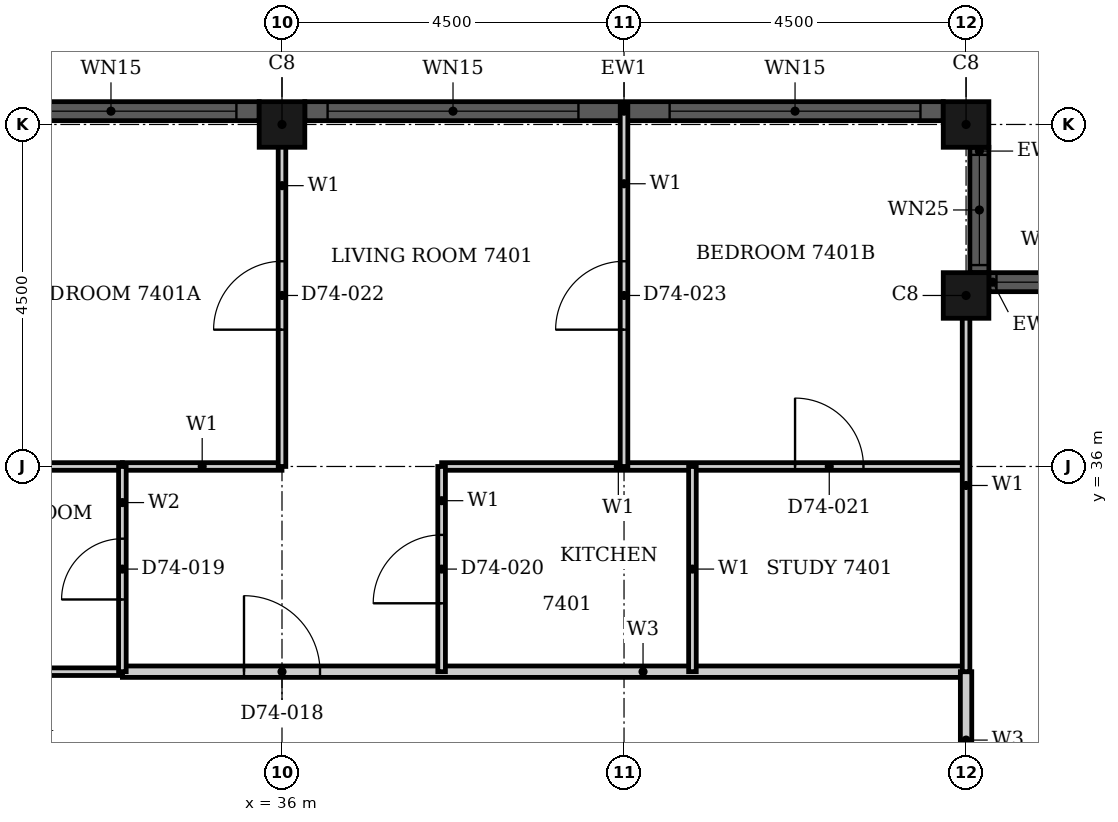
"""IFC4 building model, lengths in metres.
Left out: names, types, materials, properties, quantities, classifications, styles, units other than length and angle.
Written with IfcOpenShell. Run it as: python <this file> out.ifc"""

import sys

from ifc_helpers import new_model, si_unit, direction, frame, frame_2d, origin, origin_2d, place, context, subcontext, project, spatial, rectangle, hollow_rectangle, extrude, element, fill, save


model = new_model("IFC4")
c1 = context("Model", 3, precision=1e-05, world=origin(), true_north=direction((0.0, 1.0)))
c2 = subcontext(c1, "Body", "Model", "MODEL_VIEW")
j1 = project(units=[si_unit("LENGTHUNIT", "METRE"), si_unit("PLANEANGLEUNIT", "RADIAN")], contexts=[c1])
p1 = place(None, origin())
s1 = spatial("IfcSite", under=j1, at=p1, CompositionType="ELEMENT")
p2 = place(p1, origin())
s2 = spatial("IfcBuilding", under=s1, at=p2, CompositionType="ELEMENT")
p3 = place(p2, frame((0.0, 0.0, 290.8)))
s3 = spatial("IfcBuildingStorey", under=s2, at=p3, CompositionType="ELEMENT", Elevation=290.8)
for number, where, z_axis, x_axis in (
    (1, (45.0, 38.25, 0.0), (0.0, 0.0, 1.0), (1.0, 0.0, 0.0)),
    (2, (45.0, 40.5, 0.0), (0.0, 0.0, 1.0), (1.0, 0.0, 0.0)),
    (3, (36.0, 40.5, 0.0), (0.0, 0.0, 1.0), (1.0, 0.0, 0.0)),
):
    element("IfcColumn", number, at=place(p3, frame(where, z_axis=z_axis, x_axis=x_axis)), inside=s3, PredefinedType="COLUMN", context=c2, shape_type="SweptSolid", body=[
        extrude(hollow_rectangle(XDim=0.6, YDim=0.6, WallThickness=0.02, at=origin_2d()), origin(), (0.0, 0.0, 1.0), 3.7),
    ])
p4 = place(p3, frame((46.95, 38.425, 0.0), z_axis=(0.0, 0.0, 1.0), x_axis=(-1.0, 0.0, 0.0)))
e4 = element("IfcWall", 4, at=p4, inside=s3, PredefinedType="SOLIDWALL", context=c2, shape_type="SweptSolid", body=[
    extrude(rectangle(XDim=1.65, YDim=0.25, at=frame_2d((0.825, 0.0))), origin(), (0.0, 0.0, 1.0), 3.7),
])
p5 = place(p4, frame((0.1, 0.0, 0.9)))
e5 = element("IfcOpeningElement", 5, at=p5, cuts=e4, PredefinedType="OPENING", context=c2, shape_type="SweptSolid", body=[
    extrude(rectangle(XDim=1.45, YDim=1.85, at=frame_2d((0.725, 0.925))), frame((0.0, 0.135, 0.0), z_axis=(0.0, -1.0, 0.0), x_axis=(1.0, 0.0, 0.0)), (0.0, 0.0, 1.0), 0.27),
])
p6 = place(p3, frame((45.175, 38.55, 0.0), z_axis=(0.0, 0.0, 1.0), x_axis=(0.0, 1.0, 0.0)))
e6 = element("IfcWall", 6, at=p6, inside=s3, PredefinedType="SOLIDWALL", context=c2, shape_type="SweptSolid", body=[
    extrude(rectangle(XDim=1.65, YDim=0.25, at=frame_2d((0.825, 0.0))), origin(), (0.0, 0.0, 1.0), 3.7),
])
p7 = place(p6, frame((0.1, 0.0, 0.9)))
e7 = element("IfcOpeningElement", 7, at=p7, cuts=e6, PredefinedType="OPENING", context=c2, shape_type="SweptSolid", body=[
    extrude(rectangle(XDim=1.45, YDim=1.85, at=frame_2d((0.725, 0.925))), frame((0.0, 0.135, 0.0), z_axis=(0.0, -1.0, 0.0), x_axis=(1.0, 0.0, 0.0)), (0.0, 0.0, 1.0), 0.27),
])
p8 = place(p3, frame((44.7, 40.675, 0.0), z_axis=(0.0, 0.0, 1.0), x_axis=(-1.0, 0.0, 0.0)))
e8 = element("IfcWall", 8, at=p8, inside=s3, PredefinedType="SOLIDWALL", context=c2, shape_type="SweptSolid", body=[
    extrude(rectangle(XDim=8.4, YDim=0.25, at=frame_2d((4.2, 0.0))), origin(), (0.0, 0.0, 1.0), 3.7),
])
p9 = place(p8, frame((0.3, 0.0, 0.45)))
e9 = element("IfcOpeningElement", 9, at=p9, cuts=e8, PredefinedType="OPENING", context=c2, shape_type="SweptSolid", body=[
    extrude(rectangle(XDim=3.3, YDim=2.3, at=frame_2d((1.65, 1.15))), frame((0.0, 0.135, 0.0), z_axis=(0.0, -1.0, 0.0), x_axis=(1.0, 0.0, 0.0)), (0.0, 0.0, 1.0), 0.27),
])
p10 = place(p8, frame((4.8, 0.0, 0.45)))
e10 = element("IfcOpeningElement", 10, at=p10, cuts=e8, PredefinedType="OPENING", context=c2, shape_type="SweptSolid", body=[
    extrude(rectangle(XDim=3.3, YDim=2.3, at=frame_2d((1.65, 1.15))), frame((0.0, 0.135, 0.0), z_axis=(0.0, -1.0, 0.0), x_axis=(1.0, 0.0, 0.0)), (0.0, 0.0, 1.0), 0.27),
])
p11 = place(p3, frame((35.7, 40.675, 0.0), z_axis=(0.0, 0.0, 1.0), x_axis=(-1.0, 0.0, 0.0)))
e11 = element("IfcWall", 11, at=p11, inside=s3, PredefinedType="SOLIDWALL", context=c2, shape_type="SweptSolid", body=[
    extrude(rectangle(XDim=8.4, YDim=0.25, at=frame_2d((4.2, 0.0))), origin(), (0.0, 0.0, 1.0), 3.7),
])
p12 = place(p11, frame((0.3, 0.0, 0.45)))
e12 = element("IfcOpeningElement", 12, at=p12, cuts=e11, PredefinedType="OPENING", context=c2, shape_type="SweptSolid", body=[
    extrude(rectangle(XDim=3.3, YDim=2.3, at=frame_2d((1.65, 1.15))), frame((0.0, 0.135, 0.0), z_axis=(0.0, -1.0, 0.0), x_axis=(1.0, 0.0, 0.0)), (0.0, 0.0, 1.0), 0.27),
])
p13 = place(p11, frame((4.8, 0.0, 0.45)))
e13 = element("IfcOpeningElement", 13, at=p13, cuts=e11, PredefinedType="OPENING", context=c2, shape_type="SweptSolid", body=[
    extrude(rectangle(XDim=3.3, YDim=2.3, at=frame_2d((1.65, 1.15))), frame((0.0, 0.135, 0.0), z_axis=(0.0, -1.0, 0.0), x_axis=(1.0, 0.0, 0.0)), (0.0, 0.0, 1.0), 0.27),
])
p14 = place(p3, frame((33.9, 33.3, 0.0), z_axis=(0.0, 0.0, 1.0), x_axis=(1.0, 0.0, 0.0)))
e14 = element("IfcWall", 14, at=p14, inside=s3, PredefinedType="PARTITIONING", context=c2, shape_type="SweptSolid", body=[
    extrude(rectangle(XDim=11.1, YDim=0.15, at=frame_2d((5.55, 0.0))), origin(), (0.0, 0.0, 1.0), 3.4),
])
p15 = place(p14, frame((1.6, 0.0, 0.0)))
e15 = element("IfcOpeningElement", 15, at=p15, cuts=e14, PredefinedType="OPENING", context=c2, shape_type="SweptSolid", body=[
    extrude(rectangle(XDim=1.0, YDim=2.2, at=frame_2d((0.5, 1.1))), frame((0.0, 0.085, 0.0), z_axis=(0.0, -1.0, 0.0), x_axis=(1.0, 0.0, 0.0)), (0.0, 0.0, 1.0), 0.17),
])
p16 = place(p3, frame((45.0, 31.5, 0.0), z_axis=(0.0, 0.0, 1.0), x_axis=(0.0, 1.0, 0.0)))
e16 = element("IfcWall", 16, at=p16, inside=s3, PredefinedType="PARTITIONING", context=c2, shape_type="SweptSolid", body=[
    extrude(rectangle(XDim=1.8, YDim=0.15, at=frame_2d((0.9, 0.0))), origin(), (0.0, 0.0, 1.0), 3.4),
])
p17 = place(p3, frame((33.9, 36.0, 0.0), z_axis=(0.0, 0.0, 1.0), x_axis=(1.0, 0.0, 0.0)))
e17 = element("IfcWall", 17, at=p17, inside=s3, PredefinedType="PARTITIONING", context=c2, shape_type="SweptSolid", body=[
    extrude(rectangle(XDim=2.1, YDim=0.1, at=frame_2d((1.05, 0.0))), origin(), (0.0, 0.0, 1.0), 3.4),
])
p18 = place(p3, frame((38.1, 36.0, 0.0), z_axis=(0.0, 0.0, 1.0), x_axis=(1.0, 0.0, 0.0)))
e18 = element("IfcWall", 18, at=p18, inside=s3, PredefinedType="PARTITIONING", context=c2, shape_type="SweptSolid", body=[
    extrude(rectangle(XDim=6.9, YDim=0.1, at=frame_2d((3.45, 0.0))), origin(), (0.0, 0.0, 1.0), 3.4),
])
p19 = place(p18, frame((4.65, 0.0, 0.0)))
e19 = element("IfcOpeningElement", 19, at=p19, cuts=e18, PredefinedType="OPENING", context=c2, shape_type="SweptSolid", body=[
    extrude(rectangle(XDim=0.9, YDim=2.1, at=frame_2d((0.45, 1.05))), frame((0.0, 0.06, 0.0), z_axis=(0.0, -1.0, 0.0), x_axis=(1.0, 0.0, 0.0)), (0.0, 0.0, 1.0), 0.12),
])
p20 = place(p3, frame((36.0, 36.0, 0.0), z_axis=(0.0, 0.0, 1.0), x_axis=(0.0, 1.0, 0.0)))
e20 = element("IfcWall", 20, at=p20, inside=s3, PredefinedType="PARTITIONING", context=c2, shape_type="SweptSolid", body=[
    extrude(rectangle(XDim=4.69, YDim=0.1, at=frame_2d((2.345, 0.0))), origin(), (0.0, 0.0, 1.0), 3.4),
])
p21 = place(p20, frame((1.8, 0.0, 0.0)))
e21 = element("IfcOpeningElement", 21, at=p21, cuts=e20, PredefinedType="OPENING", context=c2, shape_type="SweptSolid", body=[
    extrude(rectangle(XDim=0.9, YDim=2.1, at=frame_2d((0.45, 1.05))), frame((0.0, 0.06, 0.0), z_axis=(0.0, -1.0, 0.0), x_axis=(1.0, 0.0, 0.0)), (0.0, 0.0, 1.0), 0.12),
])
p22 = place(p3, frame((38.1, 33.3, 0.0), z_axis=(0.0, 0.0, 1.0), x_axis=(0.0, 1.0, 0.0)))
e22 = element("IfcWall", 22, at=p22, inside=s3, PredefinedType="PARTITIONING", context=c2, shape_type="SweptSolid", body=[
    extrude(rectangle(XDim=2.7, YDim=0.1, at=frame_2d((1.35, 0.0))), origin(), (0.0, 0.0, 1.0), 3.4),
])
p23 = place(p22, frame((0.9, 0.0, 0.0)))
e23 = element("IfcOpeningElement", 23, at=p23, cuts=e22, PredefinedType="OPENING", context=c2, shape_type="SweptSolid", body=[
    extrude(rectangle(XDim=0.9, YDim=2.1, at=frame_2d((0.45, 1.05))), frame((0.0, 0.06, 0.0), z_axis=(0.0, -1.0, 0.0), x_axis=(1.0, 0.0, 0.0)), (0.0, 0.0, 1.0), 0.12),
])
p24 = place(p3, frame((40.5, 36.0, 0.0), z_axis=(0.0, 0.0, 1.0), x_axis=(0.0, 1.0, 0.0)))
e24 = element("IfcWall", 24, at=p24, inside=s3, PredefinedType="PARTITIONING", context=c2, shape_type="SweptSolid", body=[
    extrude(rectangle(XDim=4.74, YDim=0.1, at=frame_2d((2.37, 0.0))), origin(), (0.0, 0.0, 1.0), 3.4),
])
p25 = place(p24, frame((1.8, 0.0, 0.0)))
e25 = element("IfcOpeningElement", 25, at=p25, cuts=e24, PredefinedType="OPENING", context=c2, shape_type="SweptSolid", body=[
    extrude(rectangle(XDim=0.9, YDim=2.1, at=frame_2d((0.45, 1.05))), frame((0.0, 0.06, 0.0), z_axis=(0.0, -1.0, 0.0), x_axis=(1.0, 0.0, 0.0)), (0.0, 0.0, 1.0), 0.12),
])
p26 = place(p3, frame((41.4, 33.3, 0.0), z_axis=(0.0, 0.0, 1.0), x_axis=(0.0, 1.0, 0.0)))
e26 = element("IfcWall", 26, at=p26, inside=s3, PredefinedType="PARTITIONING", context=c2, shape_type="SweptSolid", body=[
    extrude(rectangle(XDim=2.7, YDim=0.1, at=frame_2d((1.35, 0.0))), origin(), (0.0, 0.0, 1.0), 3.4),
])
p27 = place(p3, frame((45.0, 33.3, 0.0), z_axis=(0.0, 0.0, 1.0), x_axis=(0.0, 1.0, 0.0)))
e27 = element("IfcWall", 27, at=p27, inside=s3, PredefinedType="PARTITIONING", context=c2, shape_type="SweptSolid", body=[
    extrude(rectangle(XDim=4.9, YDim=0.1, at=frame_2d((2.45, 0.0))), origin(), (0.0, 0.0, 1.0), 3.4),
])
for number, where, z_axis, x_axis in (
    (28, (31.5, 33.3, 0.0), (0.0, 0.0, 1.0), (1.0, 0.0, 0.0)),
    (29, (31.5, 36.0, 0.0), (0.0, 0.0, 1.0), (1.0, 0.0, 0.0)),
):
    element("IfcWall", number, at=place(p3, frame(where, z_axis=z_axis, x_axis=x_axis)), inside=s3, PredefinedType="PARTITIONING", context=c2, shape_type="SweptSolid", body=[
        extrude(rectangle(XDim=2.4, YDim=0.1, at=frame_2d((1.2, 0.0))), origin(), (0.0, 0.0, 1.0), 3.4),
    ])
p28 = place(p3, frame((33.9, 33.3, 0.0), z_axis=(0.0, 0.0, 1.0), x_axis=(0.0, 1.0, 0.0)))
e30 = element("IfcWall", 30, at=p28, inside=s3, PredefinedType="PARTITIONING", context=c2, shape_type="SweptSolid", body=[
    extrude(rectangle(XDim=2.7, YDim=0.1, at=frame_2d((1.35, 0.0))), origin(), (0.0, 0.0, 1.0), 3.4),
])
p29 = place(p28, frame((0.95, 0.0, 0.0)))
e31 = element("IfcOpeningElement", 31, at=p29, cuts=e30, PredefinedType="OPENING", context=c2, shape_type="SweptSolid", body=[
    extrude(rectangle(XDim=0.8, YDim=2.1, at=frame_2d((0.4, 1.05))), frame((0.0, 0.06, 0.0), z_axis=(0.0, -1.0, 0.0), x_axis=(1.0, 0.0, 0.0)), (0.0, 0.0, 1.0), 0.12),
])
p30 = place(p5, origin())
e32 = element("IfcWindow", 32, at=p30, inside=s3, PartitioningType="SINGLE_PANEL", PredefinedType="WINDOW", context=c2, shape_type="SweptSolid", body=[
    extrude(rectangle(XDim=1.45, YDim=1.85, at=frame_2d((0.725, 0.925))), frame((0.0, 0.03, 0.0), z_axis=(0.0, -1.0, 0.0), x_axis=(1.0, 0.0, 0.0)), (0.0, 0.0, 1.0), 0.06),
])
fill(e5, e32)
p31 = place(p7, origin())
e33 = element("IfcWindow", 33, at=p31, inside=s3, PartitioningType="SINGLE_PANEL", PredefinedType="WINDOW", context=c2, shape_type="SweptSolid", body=[
    extrude(rectangle(XDim=1.45, YDim=1.85, at=frame_2d((0.725, 0.925))), frame((0.0, 0.03, 0.0), z_axis=(0.0, -1.0, 0.0), x_axis=(1.0, 0.0, 0.0)), (0.0, 0.0, 1.0), 0.06),
])
fill(e7, e33)
p32 = place(p9, origin())
e34 = element("IfcWindow", 34, at=p32, inside=s3, PartitioningType="SINGLE_PANEL", PredefinedType="WINDOW", context=c2, shape_type="SweptSolid", body=[
    extrude(rectangle(XDim=3.3, YDim=2.3, at=frame_2d((1.65, 1.15))), frame((0.0, 0.03, 0.0), z_axis=(0.0, -1.0, 0.0), x_axis=(1.0, 0.0, 0.0)), (0.0, 0.0, 1.0), 0.06),
])
fill(e9, e34)
p33 = place(p10, origin())
e35 = element("IfcWindow", 35, at=p33, inside=s3, PartitioningType="SINGLE_PANEL", PredefinedType="WINDOW", context=c2, shape_type="SweptSolid", body=[
    extrude(rectangle(XDim=3.3, YDim=2.3, at=frame_2d((1.65, 1.15))), frame((0.0, 0.03, 0.0), z_axis=(0.0, -1.0, 0.0), x_axis=(1.0, 0.0, 0.0)), (0.0, 0.0, 1.0), 0.06),
])
fill(e10, e35)
p34 = place(p12, origin())
e36 = element("IfcWindow", 36, at=p34, inside=s3, PartitioningType="SINGLE_PANEL", PredefinedType="WINDOW", context=c2, shape_type="SweptSolid", body=[
    extrude(rectangle(XDim=3.3, YDim=2.3, at=frame_2d((1.65, 1.15))), frame((0.0, 0.03, 0.0), z_axis=(0.0, -1.0, 0.0), x_axis=(1.0, 0.0, 0.0)), (0.0, 0.0, 1.0), 0.06),
])
fill(e12, e36)
p35 = place(p15, origin())
e37 = element("IfcDoor", 37, at=p35, inside=s3, OperationType="SINGLE_SWING_RIGHT", PredefinedType="DOOR", context=c2, shape_type="SweptSolid", body=[
    extrude(rectangle(XDim=1.0, YDim=2.2, at=frame_2d((0.5, 1.1))), frame((0.0, 0.025, 0.0), z_axis=(0.0, -1.0, 0.0), x_axis=(1.0, 0.0, 0.0)), (0.0, 0.0, 1.0), 0.05),
])
fill(e15, e37)
p36 = place(p29, origin())
e38 = element("IfcDoor", 38, at=p36, inside=s3, OperationType="SINGLE_SWING_RIGHT", PredefinedType="DOOR", context=c2, shape_type="SweptSolid", body=[
    extrude(rectangle(XDim=0.8, YDim=2.1, at=frame_2d((0.4, 1.05))), frame((0.0, 0.025, 0.0), z_axis=(0.0, -1.0, 0.0), x_axis=(1.0, 0.0, 0.0)), (0.0, 0.0, 1.0), 0.05),
])
fill(e31, e38)
p37 = place(p23, origin())
e39 = element("IfcDoor", 39, at=p37, inside=s3, OperationType="SINGLE_SWING_RIGHT", PredefinedType="DOOR", context=c2, shape_type="SweptSolid", body=[
    extrude(rectangle(XDim=0.9, YDim=2.1, at=frame_2d((0.45, 1.05))), frame((0.0, 0.025, 0.0), z_axis=(0.0, -1.0, 0.0), x_axis=(1.0, 0.0, 0.0)), (0.0, 0.0, 1.0), 0.05),
])
fill(e23, e39)
p38 = place(p19, origin())
e40 = element("IfcDoor", 40, at=p38, inside=s3, OperationType="SINGLE_SWING_LEFT", PredefinedType="DOOR", context=c2, shape_type="SweptSolid", body=[
    extrude(rectangle(XDim=0.9, YDim=2.1, at=frame_2d((0.45, 1.05))), frame((0.0, 0.025, 0.0), z_axis=(0.0, -1.0, 0.0), x_axis=(1.0, 0.0, 0.0)), (0.0, 0.0, 1.0), 0.05),
])
fill(e19, e40)
p39 = place(p21, origin())
e41 = element("IfcDoor", 41, at=p39, inside=s3, OperationType="SINGLE_SWING_RIGHT", PredefinedType="DOOR", context=c2, shape_type="SweptSolid", body=[
    extrude(rectangle(XDim=0.9, YDim=2.1, at=frame_2d((0.45, 1.05))), frame((0.0, 0.025, 0.0), z_axis=(0.0, -1.0, 0.0), x_axis=(1.0, 0.0, 0.0)), (0.0, 0.0, 1.0), 0.05),
])
fill(e21, e41)
p40 = place(p25, origin())
e42 = element("IfcDoor", 42, at=p40, inside=s3, OperationType="SINGLE_SWING_LEFT", PredefinedType="DOOR", context=c2, shape_type="SweptSolid", body=[
    extrude(rectangle(XDim=0.9, YDim=2.1, at=frame_2d((0.45, 1.05))), frame((0.0, 0.025, 0.0), z_axis=(0.0, -1.0, 0.0), x_axis=(1.0, 0.0, 0.0)), (0.0, 0.0, 1.0), 0.05),
])
fill(e25, e42)
save(model, sys.argv[1])
